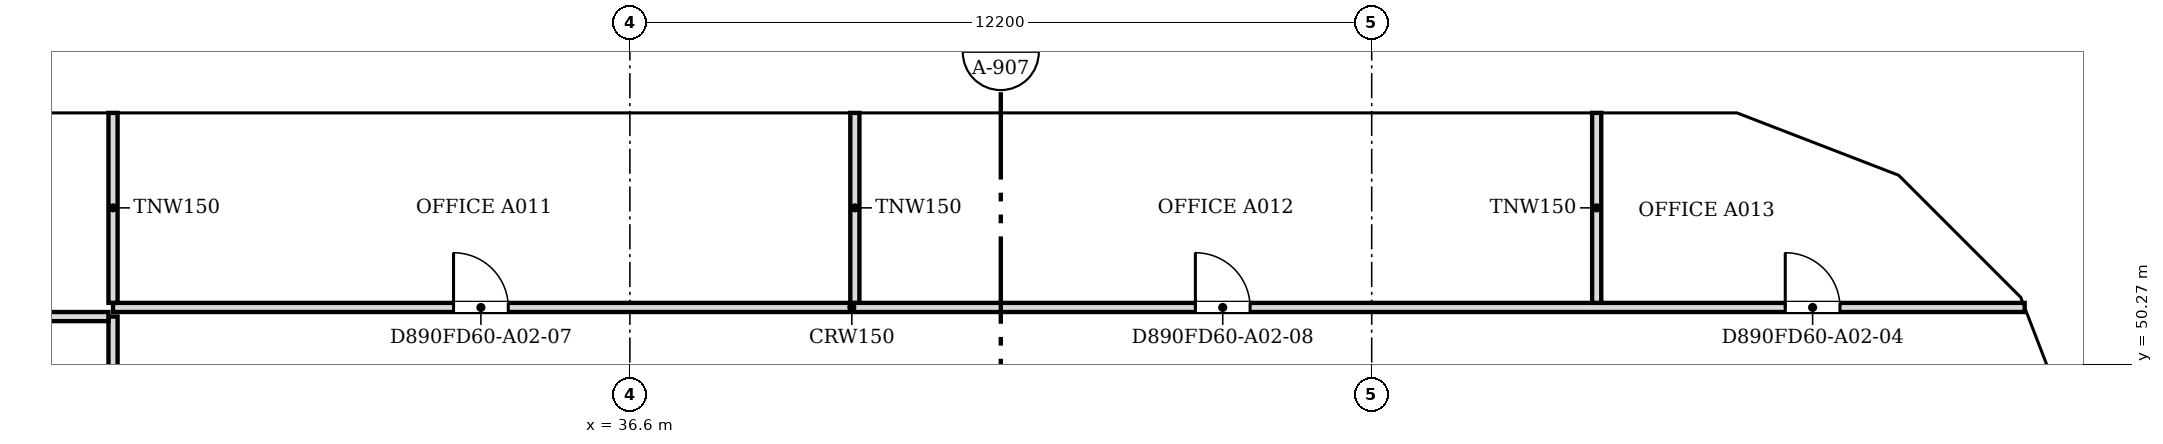
"""IFC4 building model, lengths in metres.
Left out: names, types, materials, properties, quantities, classifications, styles, units other than length and angle.
Written with IfcOpenShell. Run it as: python <this file> out.ifc"""

import sys

from ifc_helpers import new_model, si_unit, direction, frame, frame_2d, origin, place, context, subcontext, project, spatial, polyline, rectangle, outline, extrude, faceted_brep, source, transform, mapped, element, fill, save


model = new_model("IFC4")
c1 = context("Model", 3, precision=1e-05, world=origin(), true_north=direction((0.0, 1.0)))
c2 = subcontext(c1, "Body", "Model", "MODEL_VIEW")
j1 = project(units=[si_unit("LENGTHUNIT", "METRE"), si_unit("PLANEANGLEUNIT", "RADIAN")], contexts=[c1])
p1 = place(None, origin())
s1 = spatial("IfcSite", under=j1, at=p1, CompositionType="ELEMENT")
p2 = place(p1, origin())
s2 = spatial("IfcBuilding", under=s1, at=p2, CompositionType="ELEMENT")
p3 = place(p2, frame((0.0, 0.0, 33.4)))
s3 = spatial("IfcBuildingStorey", under=s2, at=p3, CompositionType="ELEMENT", Elevation=33.4)
m1 = source(origin(), c2, "Body", "Brep", [
    faceted_brep([(2.95, -0.25, 0.0), (3.003, -0.25, 0.068), (3.003, -0.25, 7.531), (2.95, -0.25, 7.6), (0.0, -0.25, 3.8), (0.047, 0.25, 3.86), (2.898, 0.25, 7.532), (2.898, 0.25, 0.068), (0.047, 0.25, 3.74), (2.95, 0.0, 0.0), (2.95, 0.0, 7.6), (0.0, 0.0, 3.8)], [[[0, 1, 2, 3, 4]], [[5, 6, 7, 8]], [[1, 0, 9]], [[10, 3, 2]], [[6, 5, 11, 4, 3, 10]], [[8, 7, 9, 0, 4, 11]], [[8, 11, 5]], [[1, 9, 7, 6, 10, 2]]]),
])
p4 = place(p3, frame((60.75, 48.753, -3.8), z_axis=(0.0, 0.0, 1.0), x_axis=(-0.35992665181, 0.932980602862, 0.0)))
e1 = element("IfcWall", 1, at=p4, inside=s3, PredefinedType="SOLIDWALL", context=c2, shape_type="MappedRepresentation", body=[
    mapped(m1, transform((0.0, 0.0, 0.0), scale=1.0)),
])
m2 = source(origin(), c2, "Body", "SweptSolid", [
    extrude(outline(polyline([(2.75, 6.935), (0.316, 3.8), (2.75, 0.665), (2.75, 6.935)])), frame((0.0, 0.26, 0.0), z_axis=(0.0, -1.0, 0.0), x_axis=(1.0, 0.0, 0.0)), (0.0, 0.0, 1.0), 0.52),
])
p5 = place(p4, origin())
e2 = element("IfcOpeningElement", 2, at=p5, cuts=e1, PredefinedType="OPENING", context=c2, shape_type="MappedRepresentation", body=[
    mapped(m2, transform((0.0, 0.0, 0.0), scale=1.0)),
])
m3 = source(origin(), c2, "Body", "Brep", [
    faceted_brep([(0.053, -0.25, 0.0), (2.997, -0.25, 3.8), (0.053, -0.25, 7.6), (0.0, -0.25, 7.532), (0.0, -0.25, 0.068), (0.106, 0.25, 7.531), (2.944, 0.25, 3.868), (2.944, 0.25, 3.732), (0.106, 0.25, 0.068), (2.997, 0.0, 3.8), (0.053, 0.0, 0.0), (0.053, 0.0, 7.6)], [[[0, 1, 2, 3, 4]], [[5, 6, 7, 8]], [[8, 7, 9, 1, 0, 10]], [[6, 5, 11, 2, 1, 9]], [[3, 2, 11]], [[10, 0, 4]], [[8, 10, 4, 3, 11, 5]], [[9, 7, 6]]]),
])
p6 = place(p3, frame((59.726, 51.469, -3.8), z_axis=(0.0, 0.0, 1.0), x_axis=(-0.707106781187, 0.707106781187, 0.0)))
e3 = element("IfcWall", 3, at=p6, inside=s3, PredefinedType="SOLIDWALL", context=c2, shape_type="MappedRepresentation", body=[
    mapped(m3, transform((0.0, 0.0, 0.0), scale=1.0)),
])
m4 = source(origin(), c2, "Body", "SweptSolid", [
    extrude(outline(polyline([(0.253, 0.666), (2.681, 3.8), (0.253, 6.934), (0.253, 0.666)])), frame((0.0, 0.26, 0.0), z_axis=(0.0, -1.0, 0.0), x_axis=(1.0, 0.0, 0.0)), (0.0, 0.0, 1.0), 0.52),
])
p7 = place(p6, origin())
e4 = element("IfcOpeningElement", 4, at=p7, cuts=e3, PredefinedType="OPENING", context=c2, shape_type="MappedRepresentation", body=[
    mapped(m4, transform((0.0, 0.0, 0.0), scale=1.0)),
])
m5 = source(origin(), c2, "Body", "Brep", [
    faceted_brep([(2.95, -0.25, 0.0), (2.997, -0.25, 0.059), (2.997, -0.25, 7.541), (2.95, -0.25, 7.6), (0.0, -0.25, 3.8), (0.053, 0.25, 3.868), (2.904, 0.25, 7.54), (2.904, 0.25, 0.06), (0.053, 0.25, 3.732), (2.95, 0.0, 0.0), (2.95, 0.0, 7.6), (0.0, 0.0, 3.8)], [[[0, 1, 2, 3, 4]], [[5, 6, 7, 8]], [[1, 0, 9]], [[10, 3, 2]], [[6, 5, 11, 4, 3, 10]], [[8, 7, 9, 0, 4, 11]], [[8, 11, 5]], [[1, 9, 7, 6, 10, 2]]]),
])
p8 = place(p3, frame((57.606, 53.588, -3.8), z_axis=(0.0, 0.0, 1.0), x_axis=(-0.932990326376, 0.359901446078, 0.0)))
e5 = element("IfcWall", 5, at=p8, inside=s3, PredefinedType="SOLIDWALL", context=c2, shape_type="MappedRepresentation", body=[
    mapped(m5, transform((0.0, 0.0, 0.0), scale=1.0)),
])
p9 = place(p8, origin())
e6 = element("IfcOpeningElement", 6, at=p9, cuts=e5, PredefinedType="OPENING", context=c2, shape_type="MappedRepresentation", body=[
    mapped(m2, transform((0.0, 0.0, 0.0), scale=1.0)),
])
m6 = source(origin(), c2, "Body", "Brep", [
    faceted_brep([(0.047, -0.25, 0.0), (3.05, -0.25, 3.8), (0.047, -0.25, 7.6), (0.0, -0.25, 7.54), (0.0, -0.25, 0.06), (0.093, 0.25, 7.541), (3.05, 0.25, 3.8), (0.093, 0.25, 0.059), (0.047, 0.0, 0.0), (0.047, 0.0, 7.6)], [[[0, 1, 2, 3, 4]], [[5, 6, 7]], [[7, 6, 1, 0, 8]], [[6, 5, 9, 2, 1]], [[3, 2, 9]], [[8, 0, 4]], [[7, 8, 4, 3, 9, 5]]]),
])
p10 = place(p3, frame((54.9, 54.65, -3.8), z_axis=(0.0, 0.0, 1.0), x_axis=(-1.0, 0.0, 0.0)))
e7 = element("IfcWall", 7, at=p10, inside=s3, PredefinedType="SOLIDWALL", context=c2, shape_type="MappedRepresentation", body=[
    mapped(m6, transform((0.0, 0.0, 0.0), scale=1.0)),
])
m7 = source(origin(), c2, "Body", "SweptSolid", [
    extrude(outline(polyline([(0.247, 0.656), (2.731, 3.8), (0.247, 6.944), (0.247, 0.656)])), frame((0.0, 0.26, 0.0), z_axis=(0.0, -1.0, 0.0), x_axis=(1.0, 0.0, 0.0)), (0.0, 0.0, 1.0), 0.52),
])
p11 = place(p10, origin())
e8 = element("IfcOpeningElement", 8, at=p11, cuts=e7, PredefinedType="OPENING", context=c2, shape_type="MappedRepresentation", body=[
    mapped(m7, transform((0.0, 0.0, 0.0), scale=1.0)),
])
m8 = source(origin(), c2, "Body", "SweptSolid", [
    extrude(outline(polyline([(3.05, 0.0), (6.1, 3.8), (3.05, 7.6), (0.0, 3.8), (3.05, 0.0)])), frame((0.0, 0.25, 0.0), z_axis=(0.0, -1.0, 0.0), x_axis=(1.0, 0.0, 0.0)), (0.0, 0.0, 1.0), 0.5),
])
p12 = place(p3, frame((51.85, 54.65, -3.8), z_axis=(0.0, 0.0, 1.0), x_axis=(-1.0, 0.0, 0.0)))
e9 = element("IfcWall", 9, at=p12, inside=s3, PredefinedType="SOLIDWALL", context=c2, shape_type="MappedRepresentation", body=[
    mapped(m8, transform((0.0, 0.0, 0.0), scale=1.0)),
])
m9 = source(origin(), c2, "Body", "SweptSolid", [
    extrude(outline(polyline([(3.05, 0.399), (5.78, 3.8), (3.05, 7.2), (0.321, 3.8), (3.05, 0.399)])), frame((0.0, 0.26, 0.0), z_axis=(0.0, -1.0, 0.0), x_axis=(1.0, 0.0, 0.0)), (0.0, 0.0, 1.0), 0.52),
])
p13 = place(p12, origin())
e10 = element("IfcOpeningElement", 10, at=p13, cuts=e9, PredefinedType="OPENING", context=c2, shape_type="MappedRepresentation", body=[
    mapped(m9, transform((0.0, 0.0, 0.0), scale=1.0)),
])
p14 = place(p3, frame((45.75, 54.65, -3.8), z_axis=(0.0, 0.0, 1.0), x_axis=(-1.0, 0.0, 0.0)))
e11 = element("IfcWall", 11, at=p14, inside=s3, PredefinedType="SOLIDWALL", context=c2, shape_type="MappedRepresentation", body=[
    mapped(m8, transform((0.0, 0.0, 0.0), scale=1.0)),
])
p15 = place(p14, origin())
e12 = element("IfcOpeningElement", 12, at=p15, cuts=e11, PredefinedType="OPENING", context=c2, shape_type="MappedRepresentation", body=[
    mapped(m9, transform((0.0, 0.0, 0.0), scale=1.0)),
])
m10 = source(origin(), c2, "Body", "Brep", [
    faceted_brep([(3.05, -0.25, 0.0), (6.1, -0.25, 3.8), (6.1, -0.25, 3.8), (3.05, -0.25, 7.6), (0.0, -0.25, 3.8), (0.0, 0.25, 3.8), (3.05, 0.25, 7.6), (6.1, 0.25, 3.8), (6.1, 0.25, 3.8), (3.05, 0.25, 0.0)], [[[0, 1, 2, 3, 4]], [[5, 6, 7, 8, 9]], [[9, 8, 1, 0]], [[7, 6, 3, 2]], [[6, 5, 4, 3]], [[5, 9, 0, 4]], [[1, 8, 7, 2]]]),
])
p16 = place(p3, frame((39.65, 54.65, -3.8), z_axis=(0.0, 0.0, 1.0), x_axis=(-1.0, 0.0, 0.0)))
e13 = element("IfcWall", 13, at=p16, inside=s3, PredefinedType="SOLIDWALL", context=c2, shape_type="MappedRepresentation", body=[
    mapped(m10, transform((0.0, 0.0, 0.0), scale=1.0)),
])
p17 = place(p16, origin())
e14 = element("IfcOpeningElement", 14, at=p17, cuts=e13, PredefinedType="OPENING", context=c2, shape_type="MappedRepresentation", body=[
    mapped(m9, transform((0.0, 0.0, 0.0), scale=1.0)),
])
p18 = place(p3, frame((33.55, 54.65, -3.8), z_axis=(0.0, 0.0, 1.0), x_axis=(-1.0, 0.0, 0.0)))
e15 = element("IfcWall", 15, at=p18, inside=s3, PredefinedType="SOLIDWALL", context=c2, shape_type="MappedRepresentation", body=[
    mapped(m8, transform((0.0, 0.0, 0.0), scale=1.0)),
])
p19 = place(p18, origin())
e16 = element("IfcOpeningElement", 16, at=p19, cuts=e15, PredefinedType="OPENING", context=c2, shape_type="MappedRepresentation", body=[
    mapped(m9, transform((0.0, 0.0, 0.0), scale=1.0)),
])
p20 = place(p3, frame((27.45, 54.65, -3.8), z_axis=(0.0, 0.0, 1.0), x_axis=(-1.0, 0.0, 0.0)))
e17 = element("IfcWall", 17, at=p20, inside=s3, PredefinedType="SOLIDWALL", context=c2, shape_type="MappedRepresentation", body=[
    mapped(m10, transform((0.0, 0.0, 0.0), scale=1.0)),
])
p21 = place(p20, origin())
e18 = element("IfcOpeningElement", 18, at=p21, cuts=e17, PredefinedType="OPENING", context=c2, shape_type="MappedRepresentation", body=[
    mapped(m9, transform((0.0, 0.0, 0.0), scale=1.0)),
])
p22 = place(p2, frame((0.0, 0.0, 37.2)))
s4 = spatial("IfcBuildingStorey", under=s2, at=p22, CompositionType="ELEMENT", Elevation=37.2)
m11 = source(origin(), c2, "Body", "Brep", [
    faceted_brep([(0.047, -0.25, 0.0), (2.997, -0.25, 3.8), (0.047, -0.25, 7.6), (0.0, -0.25, 7.541), (0.0, -0.25, 0.059), (0.093, 0.25, 7.54), (2.944, 0.25, 3.868), (2.944, 0.25, 3.732), (0.093, 0.25, 0.06), (2.997, 0.0, 3.8), (0.047, 0.0, 0.0), (0.047, 0.0, 7.6)], [[[0, 1, 2, 3, 4]], [[5, 6, 7, 8]], [[8, 7, 9, 1, 0, 10]], [[6, 5, 11, 2, 1, 9]], [[3, 2, 11]], [[10, 0, 4]], [[8, 10, 4, 3, 11, 5]], [[9, 7, 6]]]),
])
p23 = place(p22, frame((60.767, 48.71, -3.8), z_axis=(0.0, 0.0, 1.0), x_axis=(-0.359901446078, 0.932990326376, 0.0)))
e19 = element("IfcWall", 19, at=p23, inside=s4, PredefinedType="SOLIDWALL", context=c2, shape_type="MappedRepresentation", body=[
    mapped(m11, transform((0.0, 0.0, 0.0), scale=1.0)),
])
m12 = source(origin(), c2, "Body", "SweptSolid", [
    extrude(outline(polyline([(0.247, 0.665), (2.681, 3.8), (0.247, 6.935), (0.247, 0.665)])), frame((0.0, 0.26, 0.0), z_axis=(0.0, -1.0, 0.0), x_axis=(1.0, 0.0, 0.0)), (0.0, 0.0, 1.0), 0.52),
])
p24 = place(p23, origin())
e20 = element("IfcOpeningElement", 20, at=p24, cuts=e19, PredefinedType="OPENING", context=c2, shape_type="MappedRepresentation", body=[
    mapped(m12, transform((0.0, 0.0, 0.0), scale=1.0)),
])
m13 = source(origin(), c2, "Body", "Brep", [
    faceted_brep([(2.944, -0.25, 0.0), (2.997, -0.25, 0.068), (2.997, -0.25, 7.532), (2.944, -0.25, 7.6), (0.0, -0.25, 3.8), (0.053, 0.25, 3.868), (2.891, 0.25, 7.532), (2.891, 0.25, 0.068), (0.053, 0.25, 3.732), (2.944, 0.0, 0.0), (2.944, 0.0, 7.6), (0.0, 0.0, 3.8)], [[[0, 1, 2, 3, 4]], [[5, 6, 7, 8]], [[1, 0, 9]], [[10, 3, 2]], [[6, 5, 11, 4, 3, 10]], [[8, 7, 9, 0, 4, 11]], [[8, 11, 5]], [[1, 9, 7, 6, 10, 2]]]),
])
p25 = place(p22, frame((59.688, 51.506, -3.8), z_axis=(0.0, 0.0, 1.0), x_axis=(-0.707106781187, 0.707106781187, 0.0)))
e21 = element("IfcWall", 21, at=p25, inside=s4, PredefinedType="SOLIDWALL", context=c2, shape_type="MappedRepresentation", body=[
    mapped(m13, transform((0.0, 0.0, 0.0), scale=1.0)),
])
m14 = source(origin(), c2, "Body", "SweptSolid", [
    extrude(outline(polyline([(2.744, 6.934), (0.316, 3.8), (2.744, 0.667), (2.744, 6.934)])), frame((0.0, 0.26, 0.0), z_axis=(0.0, -1.0, 0.0), x_axis=(1.0, 0.0, 0.0)), (0.0, 0.0, 1.0), 0.52),
])
p26 = place(p25, origin())
e22 = element("IfcOpeningElement", 22, at=p26, cuts=e21, PredefinedType="OPENING", context=c2, shape_type="MappedRepresentation", body=[
    mapped(m14, transform((0.0, 0.0, 0.0), scale=1.0)),
])
m15 = source(origin(), c2, "Body", "Brep", [
    faceted_brep([(0.053, -0.25, 0.0), (3.003, -0.25, 3.8), (0.053, -0.25, 7.6), (0.0, -0.25, 7.532), (0.0, -0.25, 0.068), (0.106, 0.25, 7.532), (2.957, 0.25, 3.86), (2.957, 0.25, 3.74), (0.106, 0.25, 0.068), (3.003, 0.0, 3.8), (0.053, 0.0, 0.0), (0.053, 0.0, 7.6)], [[[0, 1, 2, 3, 4]], [[5, 6, 7, 8]], [[8, 7, 9, 1, 0, 10]], [[6, 5, 11, 2, 1, 9]], [[3, 2, 11]], [[10, 0, 4]], [[8, 10, 4, 3, 11, 5]], [[9, 7, 6]]]),
])
p27 = place(p22, frame((57.656, 53.569, -3.8), z_axis=(0.0, 0.0, 1.0), x_axis=(-0.933007896601, 0.359855894603, 0.0)))
e23 = element("IfcWall", 23, at=p27, inside=s4, PredefinedType="SOLIDWALL", context=c2, shape_type="MappedRepresentation", body=[
    mapped(m15, transform((0.0, 0.0, 0.0), scale=1.0)),
])
m16 = source(origin(), c2, "Body", "SweptSolid", [
    extrude(outline(polyline([(0.253, 0.665), (2.687, 3.8), (0.253, 6.935), (0.253, 0.665)])), frame((0.0, 0.26, 0.0), z_axis=(0.0, -1.0, 0.0), x_axis=(1.0, 0.0, 0.0)), (0.0, 0.0, 1.0), 0.52),
])
p28 = place(p27, origin())
e24 = element("IfcOpeningElement", 24, at=p28, cuts=e23, PredefinedType="OPENING", context=c2, shape_type="MappedRepresentation", body=[
    mapped(m16, transform((0.0, 0.0, 0.0), scale=1.0)),
])
m17 = source(origin(), c2, "Body", "Brep", [
    faceted_brep([(3.003, -0.25, 0.0), (6.053, -0.25, 3.8), (3.003, -0.25, 7.6), (0.0, -0.25, 3.8), (0.047, 0.25, 3.859), (3.003, 0.25, 7.6), (6.053, 0.25, 3.8), (3.003, 0.25, 0.0), (0.047, 0.25, 3.741), (0.0, 0.0, 3.8)], [[[0, 1, 2, 3]], [[4, 5, 6, 7, 8]], [[7, 6, 1, 0]], [[6, 5, 2, 1]], [[5, 4, 9, 3, 2]], [[8, 7, 0, 3, 9]], [[8, 9, 4]]]),
])
p29 = place(p22, frame((54.854, 54.65, -3.8), z_axis=(0.0, 0.0, 1.0), x_axis=(-1.0, 0.0, 0.0)))
e25 = element("IfcWall", 25, at=p29, inside=s4, PredefinedType="SOLIDWALL", context=c2, shape_type="MappedRepresentation", body=[
    mapped(m17, transform((0.0, 0.0, 0.0), scale=1.0)),
])
m18 = source(origin(), c2, "Body", "SweptSolid", [
    extrude(outline(polyline([(3.005, 0.401), (5.733, 3.8), (3.005, 7.199), (0.319, 3.8), (3.005, 0.401)])), frame((0.0, 0.26, 0.0), z_axis=(0.0, -1.0, 0.0), x_axis=(1.0, 0.0, 0.0)), (0.0, 0.0, 1.0), 0.52),
])
p30 = place(p29, origin())
e26 = element("IfcOpeningElement", 26, at=p30, cuts=e25, PredefinedType="OPENING", context=c2, shape_type="MappedRepresentation", body=[
    mapped(m18, transform((0.0, 0.0, 0.0), scale=1.0)),
])
m19 = source(origin(), c2, "Body", "SweptSolid", [
    extrude(outline(polyline([(3.05, 0.0), (6.1, 3.8), (3.05, 7.6), (0.0, 3.8), (3.05, 0.0)])), frame((0.0, 0.25, 0.0), z_axis=(0.0, -1.0, 0.0), x_axis=(1.0, 0.0, 0.0)), (0.0, 0.0, 1.0), 0.5),
])
p31 = place(p22, frame((48.8, 54.65, -3.8), z_axis=(0.0, 0.0, 1.0), x_axis=(-1.0, 0.0, 0.0)))
e27 = element("IfcWall", 27, at=p31, inside=s4, PredefinedType="SOLIDWALL", context=c2, shape_type="MappedRepresentation", body=[
    mapped(m19, transform((0.0, 0.0, 0.0), scale=1.0)),
])
m20 = source(origin(), c2, "Body", "SweptSolid", [
    extrude(outline(polyline([(3.05, 0.399), (5.78, 3.8), (3.05, 7.201), (0.321, 3.8), (3.05, 0.399)])), frame((0.0, 0.26, 0.0), z_axis=(0.0, -1.0, 0.0), x_axis=(1.0, 0.0, 0.0)), (0.0, 0.0, 1.0), 0.52),
])
p32 = place(p31, origin())
e28 = element("IfcOpeningElement", 28, at=p32, cuts=e27, PredefinedType="OPENING", context=c2, shape_type="MappedRepresentation", body=[
    mapped(m20, transform((0.0, 0.0, 0.0), scale=1.0)),
])
m21 = source(origin(), c2, "Body", "Brep", [
    faceted_brep([(3.05, -0.25, 0.0), (6.1, -0.25, 3.8), (6.1, -0.25, 3.8), (3.05, -0.25, 7.6), (0.0, -0.25, 3.8), (0.0, 0.25, 3.8), (3.05, 0.25, 7.6), (6.1, 0.25, 3.8), (6.1, 0.25, 3.8), (3.05, 0.25, 0.0)], [[[0, 1, 2, 3, 4]], [[5, 6, 7, 8, 9]], [[9, 8, 1, 0]], [[7, 6, 3, 2]], [[6, 5, 4, 3]], [[5, 9, 0, 4]], [[1, 8, 7, 2]]]),
])
p33 = place(p22, frame((42.7, 54.65, -3.8), z_axis=(0.0, 0.0, 1.0), x_axis=(-1.0, 0.0, 0.0)))
e29 = element("IfcWall", 29, at=p33, inside=s4, PredefinedType="SOLIDWALL", context=c2, shape_type="MappedRepresentation", body=[
    mapped(m21, transform((0.0, 0.0, 0.0), scale=1.0)),
])
p34 = place(p33, origin())
e30 = element("IfcOpeningElement", 30, at=p34, cuts=e29, PredefinedType="OPENING", context=c2, shape_type="MappedRepresentation", body=[
    mapped(m20, transform((0.0, 0.0, 0.0), scale=1.0)),
])
p35 = place(p22, frame((36.6, 54.65, -3.8), z_axis=(0.0, 0.0, 1.0), x_axis=(-1.0, 0.0, 0.0)))
e31 = element("IfcWall", 31, at=p35, inside=s4, PredefinedType="SOLIDWALL", context=c2, shape_type="MappedRepresentation", body=[
    mapped(m19, transform((0.0, 0.0, 0.0), scale=1.0)),
])
p36 = place(p35, origin())
e32 = element("IfcOpeningElement", 32, at=p36, cuts=e31, PredefinedType="OPENING", context=c2, shape_type="MappedRepresentation", body=[
    mapped(m20, transform((0.0, 0.0, 0.0), scale=1.0)),
])
p37 = place(p22, frame((30.5, 54.65, -3.8), z_axis=(0.0, 0.0, 1.0), x_axis=(-1.0, 0.0, 0.0)))
e33 = element("IfcWall", 33, at=p37, inside=s4, PredefinedType="SOLIDWALL", context=c2, shape_type="MappedRepresentation", body=[
    mapped(m19, transform((0.0, 0.0, 0.0), scale=1.0)),
])
p38 = place(p37, origin())
e34 = element("IfcOpeningElement", 34, at=p38, cuts=e33, PredefinedType="OPENING", context=c2, shape_type="MappedRepresentation", body=[
    mapped(m20, transform((0.0, 0.0, 0.0), scale=1.0)),
])
p39 = place(p3, frame((28.1, 47.776, 0.0), z_axis=(0.0, 0.0, 1.0), x_axis=(0.0, 1.0, 0.0)))
e35 = element("IfcWall", 35, at=p39, inside=s3, PredefinedType="PARTITIONING", context=c2, shape_type="SweptSolid", body=[
    extrude(rectangle(XDim=3.274, YDim=0.15, at=frame_2d((1.637, 0.0))), origin(), (0.0, 0.0, 1.0), 3.067),
])
p40 = place(p3, frame((19.7, 51.05, 0.0), z_axis=(0.0, 0.0, 1.0), x_axis=(1.0, 0.0, 0.0)))
e36 = element("IfcWall", 36, at=p40, inside=s3, PredefinedType="PARTITIONING", context=c2, shape_type="SweptSolid", body=[
    extrude(rectangle(XDim=8.324, YDim=0.15, at=frame_2d((4.162, 0.0))), origin(), (0.0, 0.0, 1.0), 3.067),
])
m22 = source(origin(), c2, "Body", "SweptSolid", [
    extrude(rectangle(XDim=0.9, YDim=2.1, at=frame_2d((0.45, 1.05))), frame((0.0, 0.085, 0.0), z_axis=(0.0, -1.0, 0.0), x_axis=(1.0, 0.0, 0.0)), (0.0, 0.0, 1.0), 0.17),
])
p41 = place(p40, frame((1.6, 0.0, 0.0)))
e37 = element("IfcOpeningElement", 37, at=p41, cuts=e36, PredefinedType="OPENING", context=c2, shape_type="MappedRepresentation", body=[
    mapped(m22, transform((0.0, 0.0, 0.0), scale=1.0)),
])
p42 = place(p40, frame((5.758, 0.0, 0.0)))
e38 = element("IfcOpeningElement", 38, at=p42, cuts=e36, PredefinedType="OPENING", context=c2, shape_type="MappedRepresentation", body=[
    mapped(m22, transform((0.0, 0.0, 0.0), scale=1.0)),
])
p43 = place(p3, frame((28.1, 51.2, 0.0), z_axis=(0.0, 0.0, 1.0), x_axis=(1.0, 0.0, 0.0)))
e39 = element("IfcWall", 39, at=p43, inside=s3, PredefinedType="PARTITIONING", context=c2, shape_type="SweptSolid", body=[
    extrude(rectangle(XDim=31.438, YDim=0.15, at=frame_2d((15.719, 0.0))), origin(), (0.0, 0.0, 1.0), 3.067),
])
p44 = place(p43, frame((27.501, 0.0, 0.0)))
e40 = element("IfcOpeningElement", 40, at=p44, cuts=e39, PredefinedType="OPENING", context=c2, shape_type="MappedRepresentation", body=[
    mapped(m22, transform((0.0, 0.0, 0.0), scale=1.0)),
])
p45 = place(p43, frame((5.6, 0.0, 0.0)))
e41 = element("IfcOpeningElement", 41, at=p45, cuts=e39, PredefinedType="OPENING", context=c2, shape_type="MappedRepresentation", body=[
    mapped(m22, transform((0.0, 0.0, 0.0), scale=1.0)),
])
p46 = place(p43, frame((17.8, 0.0, 0.0)))
e42 = element("IfcOpeningElement", 42, at=p46, cuts=e39, PredefinedType="OPENING", context=c2, shape_type="MappedRepresentation", body=[
    mapped(m22, transform((0.0, 0.0, 0.0), scale=1.0)),
])
for number, where, z_axis, x_axis in (
    (43, (28.1, 51.276, 0.0), (0.0, 0.0, 1.0), (0.0, 1.0, 0.0)),
    (44, (40.3, 51.276, 0.0), (0.0, 0.0, 1.0), (0.0, 1.0, 0.0)),
    (45, (52.5, 51.276, 0.0), (0.0, 0.0, 1.0), (0.0, 1.0, 0.0)),
):
    element("IfcWall", number, at=place(p3, frame(where, z_axis=z_axis, x_axis=x_axis)), inside=s3, PredefinedType="PARTITIONING", context=c2, shape_type="SweptSolid", body=[
        extrude(rectangle(XDim=3.124, YDim=0.15, at=frame_2d((1.562, 0.0))), origin(), (0.0, 0.0, 1.0), 3.067),
    ])
m23 = source(origin(), c2, "Body", "SweptSolid", [
    extrude(rectangle(XDim=0.9, YDim=2.1, at=frame_2d((0.45, 1.05))), frame((0.0, 0.025, 0.0), z_axis=(0.0, -1.0, 0.0), x_axis=(1.0, 0.0, 0.0)), (0.0, 0.0, 1.0), 0.05),
])
p47 = place(p44, origin())
e46 = element("IfcDoor", 46, at=p47, inside=s3, OperationType="SINGLE_SWING_LEFT", PredefinedType="DOOR", context=c2, shape_type="MappedRepresentation", body=[
    mapped(m23, transform((0.0, 0.0, 0.0), scale=1.0)),
])
fill(e40, e46)
p48 = place(p45, origin())
e47 = element("IfcDoor", 47, at=p48, inside=s3, OperationType="SINGLE_SWING_LEFT", PredefinedType="DOOR", context=c2, shape_type="MappedRepresentation", body=[
    mapped(m23, transform((0.0, 0.0, 0.0), scale=1.0)),
])
fill(e41, e47)
p49 = place(p46, origin())
e48 = element("IfcDoor", 48, at=p49, inside=s3, OperationType="SINGLE_SWING_LEFT", PredefinedType="DOOR", context=c2, shape_type="MappedRepresentation", body=[
    mapped(m23, transform((0.0, 0.0, 0.0), scale=1.0)),
])
fill(e42, e48)
save(model, sys.argv[1])
